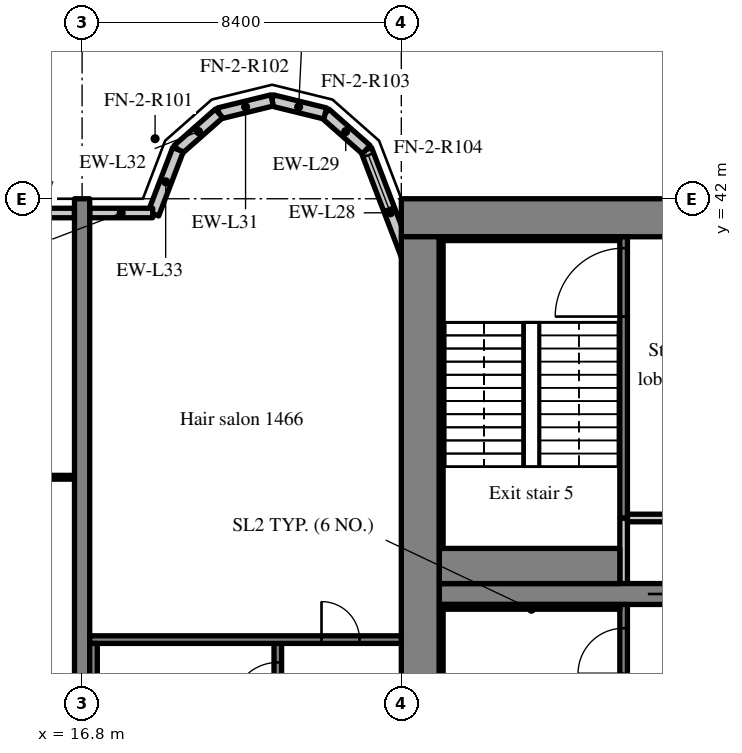
"""IFC4 building model, lengths in metres.
Left out: names, types, materials, properties, quantities, classifications, styles, units other than length and angle.
Written with IfcOpenShell. Run it as: python <this file> out.ifc"""

import sys

from ifc_helpers import new_model, si_unit, direction, frame, frame_2d, origin, place, context, subcontext, project, spatial, rectangle, extrude, source, transform, mapped, element, fill, save


model = new_model("IFC4")
c1 = context("Model", 3, precision=1e-05, world=origin(), true_north=direction((0.0, 1.0)))
c2 = subcontext(c1, "Body", "Model", "MODEL_VIEW")
j1 = project(units=[si_unit("LENGTHUNIT", "METRE"), si_unit("PLANEANGLEUNIT", "RADIAN")], contexts=[c1])
p1 = place(None, origin())
s1 = spatial("IfcSite", under=j1, at=p1, CompositionType="ELEMENT")
p2 = place(p1, origin())
s2 = spatial("IfcBuilding", under=s1, at=p2, CompositionType="ELEMENT")
p3 = place(p2, frame((0.0, 0.0, 62.0)))
s3 = spatial("IfcBuildingStorey", under=s2, at=p3, CompositionType="ELEMENT", Elevation=62.0)
m1 = source(origin(), c2, "Body", "SweptSolid", [
    extrude(rectangle(XDim=50.4, YDim=1.0, at=frame_2d((25.2, 0.0))), origin(), (0.0, 0.0, 1.0), 3.52),
])
p4 = place(p3, frame((25.2, 41.5, 0.0), z_axis=(0.0, 0.0, 1.0), x_axis=(1.0, 0.0, 0.0)))
e1 = element("IfcWall", 1, at=p4, inside=s3, PredefinedType="SHEAR", context=c2, shape_type="MappedRepresentation", body=[
    mapped(m1, transform((0.0, 0.0, 0.0), scale=1.0)),
])
m2 = source(origin(), c2, "Body", "SweptSolid", [
    extrude(rectangle(XDim=18.0, YDim=1.0, at=frame_2d((9.0, 0.0))), origin(), (0.0, 0.0, 1.0), 3.52),
])
p5 = place(p3, frame((25.7, 23.0, 0.0), z_axis=(0.0, 0.0, 1.0), x_axis=(0.0, 1.0, 0.0)))
e2 = element("IfcWall", 2, at=p5, inside=s3, PredefinedType="SHEAR", context=c2, shape_type="MappedRepresentation", body=[
    mapped(m2, transform((0.0, 0.0, 0.0), scale=1.0)),
])
m3 = source(origin(), c2, "Body", "SweptSolid", [
    extrude(rectangle(XDim=7.125, YDim=0.55, at=frame_2d((3.562, 0.0))), origin(), (0.0, 0.0, 1.0), 3.52),
])
p6 = place(p3, frame((26.2, 31.6, 0.0), z_axis=(0.0, 0.0, 1.0), x_axis=(1.0, 0.0, 0.0)))
e3 = element("IfcWall", 3, at=p6, inside=s3, PredefinedType="SHEAR", context=c2, shape_type="MappedRepresentation", body=[
    mapped(m3, transform((0.0, 0.0, 0.0), scale=1.0)),
])
m4 = source(origin(), c2, "Body", "SweptSolid", [
    extrude(rectangle(XDim=1.1, YDim=2.1, at=frame_2d((0.55, 1.05))), frame((0.0, 0.285, 0.0), z_axis=(0.0, -1.0, 0.0), x_axis=(1.0, 0.0, 0.0)), (0.0, 0.0, 1.0), 0.57),
])
p7 = place(p6, frame((5.488, 0.0, 0.0)))
e4 = element("IfcOpeningElement", 4, at=p7, cuts=e3, PredefinedType="OPENING", context=c2, shape_type="MappedRepresentation", body=[
    mapped(m4, transform((0.0, 0.0, 0.0), scale=1.0)),
])
m5 = source(origin(), c2, "Body", "SweptSolid", [
    extrude(rectangle(XDim=20.0, YDim=0.4, at=frame_2d((10.0, 0.0))), origin(), (0.0, 0.0, 1.0), 3.52),
])
p8 = place(p3, frame((16.8, 22.0, 0.0), z_axis=(0.0, 0.0, 1.0), x_axis=(0.0, 1.0, 0.0)))
e5 = element("IfcWall", 5, at=p8, inside=s3, PredefinedType="SHEAR", context=c2, shape_type="MappedRepresentation", body=[
    mapped(m5, transform((0.0, 0.0, 0.0), scale=1.0)),
])
m6 = source(origin(), c2, "Body", "SweptSolid", [
    extrude(rectangle(XDim=3.559, YDim=0.3, at=frame_2d((1.78, 0.0))), origin(), (0.0, 0.0, 1.0), 3.52),
])
p9 = place(p3, frame((25.55, 39.969, 0.0), z_axis=(0.0, 0.0, 1.0), x_axis=(-0.35779745313, 0.933799219604, 0.0)))
e6 = element("IfcWall", 6, at=p9, inside=s3, PredefinedType="SOLIDWALL", context=c2, shape_type="MappedRepresentation", body=[
    mapped(m6, transform((0.0, 0.0, 0.0), scale=1.0)),
])
m7 = source(origin(), c2, "Body", "SweptSolid", [
    extrude(rectangle(XDim=1.5, YDim=2.0, at=frame_2d((0.75, 1.0))), frame((0.0, 0.16, 0.0), z_axis=(0.0, -1.0, 0.0), x_axis=(1.0, 0.0, 0.0)), (0.0, 0.0, 1.0), 0.32),
])
p10 = place(p9, frame((1.903, 0.0, 0.9)))
e7 = element("IfcOpeningElement", 7, at=p10, cuts=e6, PredefinedType="OPENING", context=c2, shape_type="MappedRepresentation", body=[
    mapped(m7, transform((0.0, 0.0, 0.0), scale=1.0)),
])
m8 = source(origin(), c2, "Body", "SweptSolid", [
    extrude(rectangle(XDim=1.44, YDim=0.3, at=frame_2d((0.72, 0.0))), origin(), (0.0, 0.0, 1.0), 3.52),
])
p11 = place(p3, frame((24.277, 43.292, 0.0), z_axis=(0.0, 0.0, 1.0), x_axis=(-0.749649827867, 0.661834673902, 0.0)))
e8 = element("IfcWall", 8, at=p11, inside=s3, PredefinedType="SOLIDWALL", context=c2, shape_type="MappedRepresentation", body=[
    mapped(m8, transform((0.0, 0.0, 0.0), scale=1.0)),
])
m9 = source(origin(), c2, "Body", "SweptSolid", [
    extrude(rectangle(XDim=1.438, YDim=0.3, at=frame_2d((0.719, 0.0))), origin(), (0.0, 0.0, 1.0), 3.52),
])
p12 = place(p3, frame((23.197, 44.245, 0.0), z_axis=(0.0, 0.0, 1.0), x_axis=(-0.971152283879, 0.238460146601, 0.0)))
e9 = element("IfcWall", 9, at=p12, inside=s3, PredefinedType="SOLIDWALL", context=c2, shape_type="MappedRepresentation", body=[
    mapped(m9, transform((0.0, 0.0, 0.0), scale=1.0)),
])
m10 = source(origin(), c2, "Body", "SweptSolid", [
    extrude(rectangle(XDim=1.439, YDim=0.3, at=frame_2d((0.719, 0.0))), origin(), (0.0, 0.0, 1.0), 3.52),
])
p13 = place(p3, frame((21.8, 44.588, 0.0), z_axis=(0.0, 0.0, 1.0), x_axis=(-0.971161932466, -0.238420848351, 0.0)))
e10 = element("IfcWall", 10, at=p13, inside=s3, PredefinedType="SOLIDWALL", context=c2, shape_type="MappedRepresentation", body=[
    mapped(m10, transform((0.0, 0.0, 0.0), scale=1.0)),
])
m11 = source(origin(), c2, "Body", "SweptSolid", [
    extrude(rectangle(XDim=1.44, YDim=0.3, at=frame_2d((0.72, 0.0))), origin(), (0.0, 0.0, 1.0), 3.52),
])
p14 = place(p3, frame((20.403, 44.245, 0.0), z_axis=(0.0, 0.0, 1.0), x_axis=(-0.74957555648, -0.661918790432, 0.0)))
e11 = element("IfcWall", 11, at=p14, inside=s3, PredefinedType="SOLIDWALL", context=c2, shape_type="MappedRepresentation", body=[
    mapped(m11, transform((0.0, 0.0, 0.0), scale=1.0)),
])
m12 = source(origin(), c2, "Body", "SweptSolid", [
    extrude(rectangle(XDim=1.812, YDim=0.3, at=frame_2d((0.906, 0.0))), origin(), (0.0, 0.0, 1.0), 3.52),
])
p15 = place(p3, frame((19.323, 43.292, 0.0), z_axis=(0.0, 0.0, 1.0), x_axis=(-0.357877270961, -0.93376863244, 0.0)))
e12 = element("IfcWall", 12, at=p15, inside=s3, PredefinedType="SOLIDWALL", context=c2, shape_type="MappedRepresentation", body=[
    mapped(m12, transform((0.0, 0.0, 0.0), scale=1.0)),
])
m13 = source(origin(), c2, "Body", "SweptSolid", [
    extrude(rectangle(XDim=3.6, YDim=0.25, at=frame_2d((1.8, 0.0))), origin(), (0.0, 0.0, 1.0), 2.82),
])
p16 = place(p3, frame((16.6, 41.625, 0.0), z_axis=(0.0, 0.0, 1.0), x_axis=(-1.0, 0.0, 0.0)))
e13 = element("IfcWall", 13, at=p16, inside=s3, PredefinedType="SOLIDWALL", context=c2, shape_type="MappedRepresentation", body=[
    mapped(m13, transform((0.0, 0.0, 0.0), scale=1.0)),
])
m14 = source(origin(), c2, "Body", "SweptSolid", [
    extrude(rectangle(XDim=1.5, YDim=1.5, at=frame_2d((0.75, 0.75))), frame((0.0, 0.135, 0.0), z_axis=(0.0, -1.0, 0.0), x_axis=(1.0, 0.0, 0.0)), (0.0, 0.0, 1.0), 0.27),
])
p17 = place(p16, frame((1.05, 0.0, 0.9)))
e14 = element("IfcOpeningElement", 14, at=p17, cuts=e13, PredefinedType="OPENING", context=c2, shape_type="MappedRepresentation", body=[
    mapped(m14, transform((0.0, 0.0, 0.0), scale=1.0)),
])
m15 = source(origin(), c2, "Body", "SweptSolid", [
    extrude(rectangle(XDim=1.658, YDim=0.25, at=frame_2d((0.829, 0.0))), origin(), (0.0, 0.0, 1.0), 2.82),
])
p18 = place(p3, frame((18.658, 41.625, 0.0), z_axis=(0.0, 0.0, 1.0), x_axis=(-1.0, 0.0, 0.0)))
e15 = element("IfcWall", 15, at=p18, inside=s3, PredefinedType="SOLIDWALL", context=c2, shape_type="MappedRepresentation", body=[
    mapped(m15, transform((0.0, 0.0, 0.0), scale=1.0)),
])
m16 = source(origin(), c2, "Body", "SweptSolid", [
    extrude(rectangle(XDim=8.325, YDim=0.2, at=frame_2d((4.163, 0.0))), origin(), (0.0, 0.0, 1.0), 3.52),
])
p19 = place(p3, frame((31.05, 23.0, 0.0), z_axis=(0.0, 0.0, 1.0), x_axis=(0.0, 1.0, 0.0)))
e16 = element("IfcWall", 16, at=p19, inside=s3, PredefinedType="SOLIDWALL", context=c2, shape_type="MappedRepresentation", body=[
    mapped(m16, transform((0.0, 0.0, 0.0), scale=1.0)),
])
m17 = source(origin(), c2, "Body", "SweptSolid", [
    extrude(rectangle(XDim=1.2, YDim=2.1, at=frame_2d((0.6, 1.05))), frame((0.0, 0.11, 0.0), z_axis=(0.0, -1.0, 0.0), x_axis=(1.0, 0.0, 0.0)), (0.0, 0.0, 1.0), 0.22),
])
p20 = place(p19, frame((6.5, 0.0, 0.0)))
e17 = element("IfcOpeningElement", 17, at=p20, cuts=e16, PredefinedType="OPENING", context=c2, shape_type="MappedRepresentation", body=[
    mapped(m17, transform((0.0, 0.0, 0.0), scale=1.0)),
])
m18 = source(origin(), c2, "Body", "SweptSolid", [
    extrude(rectangle(XDim=1.725, YDim=0.2, at=frame_2d((0.863, 0.0))), origin(), (0.0, 0.0, 1.0), 3.52),
])
p21 = place(p3, frame((31.05, 31.875, 0.0), z_axis=(0.0, 0.0, 1.0), x_axis=(0.0, 1.0, 0.0)))
e18 = element("IfcWall", 18, at=p21, inside=s3, PredefinedType="SOLIDWALL", context=c2, shape_type="MappedRepresentation", body=[
    mapped(m18, transform((0.0, 0.0, 0.0), scale=1.0)),
])
m19 = source(origin(), c2, "Body", "SweptSolid", [
    extrude(rectangle(XDim=2.175, YDim=0.2, at=frame_2d((1.087, 0.0))), origin(), (0.0, 0.0, 1.0), 3.52),
])
p22 = place(p3, frame((31.15, 33.6, 0.0), z_axis=(0.0, 0.0, 1.0), x_axis=(1.0, 0.0, 0.0)))
e19 = element("IfcWall", 19, at=p22, inside=s3, PredefinedType="SOLIDWALL", context=c2, shape_type="MappedRepresentation", body=[
    mapped(m19, transform((0.0, 0.0, 0.0), scale=1.0)),
])
m20 = source(origin(), c2, "Body", "SweptSolid", [
    extrude(rectangle(XDim=7.4, YDim=0.2, at=frame_2d((3.7, 0.0))), origin(), (0.0, 0.0, 1.0), 3.52),
])
p23 = place(p3, frame((31.05, 33.6, 0.0), z_axis=(0.0, 0.0, 1.0), x_axis=(0.0, 1.0, 0.0)))
e20 = element("IfcWall", 20, at=p23, inside=s3, PredefinedType="SOLIDWALL", context=c2, shape_type="MappedRepresentation", body=[
    mapped(m20, transform((0.0, 0.0, 0.0), scale=1.0)),
])
m21 = source(origin(), c2, "Body", "SweptSolid", [
    extrude(rectangle(XDim=1.8, YDim=2.1, at=frame_2d((0.9, 1.05))), frame((0.0, 0.11, 0.0), z_axis=(0.0, -1.0, 0.0), x_axis=(1.0, 0.0, 0.0)), (0.0, 0.0, 1.0), 0.22),
])
p24 = place(p23, frame((5.3, 0.0, 0.0)))
e21 = element("IfcOpeningElement", 21, at=p24, cuts=e20, PredefinedType="OPENING", context=c2, shape_type="MappedRepresentation", body=[
    mapped(m21, transform((0.0, 0.0, 0.0), scale=1.0)),
])
m22 = source(origin(), c2, "Body", "SweptSolid", [
    extrude(rectangle(XDim=8.3, YDim=0.2, at=frame_2d((4.15, 0.0))), origin(), (0.0, 0.0, 1.0), 3.52),
])
p25 = place(p3, frame((21.95, 22.1, 0.0), z_axis=(0.0, 0.0, 1.0), x_axis=(0.0, 1.0, 0.0)))
e22 = element("IfcWall", 22, at=p25, inside=s3, PredefinedType="SOLIDWALL", context=c2, shape_type="MappedRepresentation", body=[
    mapped(m22, transform((0.0, 0.0, 0.0), scale=1.0)),
])
p26 = place(p25, frame((6.5, 0.0, 0.0)))
e23 = element("IfcOpeningElement", 23, at=p26, cuts=e22, PredefinedType="OPENING", context=c2, shape_type="MappedRepresentation", body=[
    mapped(m17, transform((0.0, 0.0, 0.0), scale=1.0)),
])
m23 = source(origin(), c2, "Body", "SweptSolid", [
    extrude(rectangle(XDim=8.2, YDim=0.2, at=frame_2d((4.1, 0.0))), origin(), (0.0, 0.0, 1.0), 3.52),
])
p27 = place(p3, frame((17.0, 30.4, 0.0), z_axis=(0.0, 0.0, 1.0), x_axis=(1.0, 0.0, 0.0)))
e24 = element("IfcWall", 24, at=p27, inside=s3, PredefinedType="SOLIDWALL", context=c2, shape_type="MappedRepresentation", body=[
    mapped(m23, transform((0.0, 0.0, 0.0), scale=1.0)),
])
m24 = source(origin(), c2, "Body", "SweptSolid", [
    extrude(rectangle(XDim=1.0, YDim=2.1, at=frame_2d((0.5, 1.05))), frame((0.0, 0.11, 0.0), z_axis=(0.0, -1.0, 0.0), x_axis=(1.0, 0.0, 0.0)), (0.0, 0.0, 1.0), 0.22),
])
p28 = place(p27, frame((6.1, 0.0, 0.0)))
e25 = element("IfcOpeningElement", 25, at=p28, cuts=e24, PredefinedType="OPENING", context=c2, shape_type="MappedRepresentation", body=[
    mapped(m24, transform((0.0, 0.0, 0.0), scale=1.0)),
])
m25 = source(origin(), c2, "Body", "SweptSolid", [
    extrude(rectangle(XDim=4.75, YDim=0.125, at=frame_2d((2.375, 0.0))), origin(), (0.0, 0.0, 1.0), 3.52),
])
p29 = place(p3, frame((26.2, 31.262, 0.0), z_axis=(0.0, 0.0, 1.0), x_axis=(1.0, 0.0, 0.0)))
e26 = element("IfcWall", 26, at=p29, inside=s3, PredefinedType="SOLIDWALL", context=c2, shape_type="MappedRepresentation", body=[
    mapped(m25, transform((0.0, 0.0, 0.0), scale=1.0)),
])
m26 = source(origin(), c2, "Body", "SweptSolid", [
    extrude(rectangle(XDim=8.1, YDim=0.1, at=frame_2d((4.05, 0.0))), origin(), (0.0, 0.0, 1.0), 3.52),
])
p30 = place(p3, frame((26.25, 23.1, 0.0), z_axis=(0.0, 0.0, 1.0), x_axis=(0.0, 1.0, 0.0)))
e27 = element("IfcWall", 27, at=p30, inside=s3, PredefinedType="SOLIDWALL", context=c2, shape_type="MappedRepresentation", body=[
    mapped(m26, transform((0.0, 0.0, 0.0), scale=1.0)),
])
m27 = source(origin(), c2, "Body", "SweptSolid", [
    extrude(rectangle(XDim=8.1, YDim=0.2, at=frame_2d((4.05, 0.0))), origin(), (0.0, 0.0, 1.0), 3.52),
])
p31 = place(p3, frame((17.1, 22.2, 0.0), z_axis=(0.0, 0.0, 1.0), x_axis=(0.0, 1.0, 0.0)))
e28 = element("IfcWall", 28, at=p31, inside=s3, PredefinedType="SOLIDWALL", context=c2, shape_type="MappedRepresentation", body=[
    mapped(m27, transform((0.0, 0.0, 0.0), scale=1.0)),
])
m28 = source(origin(), c2, "Body", "SweptSolid", [
    extrude(rectangle(XDim=4.75, YDim=0.1, at=frame_2d((2.375, 0.0))), origin(), (0.0, 0.0, 1.0), 3.52),
])
p32 = place(p3, frame((26.2, 40.95, 0.0), z_axis=(0.0, 0.0, 1.0), x_axis=(1.0, 0.0, 0.0)))
e29 = element("IfcWall", 29, at=p32, inside=s3, PredefinedType="SOLIDWALL", context=c2, shape_type="MappedRepresentation", body=[
    mapped(m28, transform((0.0, 0.0, 0.0), scale=1.0)),
])
m29 = source(origin(), c2, "Body", "SweptSolid", [
    extrude(rectangle(XDim=4.75, YDim=0.925, at=frame_2d((2.375, 0.0))), origin(), (0.0, 0.0, 1.0), 3.52),
])
p33 = place(p3, frame((26.2, 32.337, 0.0), z_axis=(0.0, 0.0, 1.0), x_axis=(1.0, 0.0, 0.0)))
e30 = element("IfcWall", 30, at=p33, inside=s3, PredefinedType="SOLIDWALL", context=c2, shape_type="MappedRepresentation", body=[
    mapped(m29, transform((0.0, 0.0, 0.0), scale=1.0)),
])
p34 = place(p3, frame((26.25, 32.8, 0.0), z_axis=(0.0, 0.0, 1.0), x_axis=(0.0, 1.0, 0.0)))
e31 = element("IfcWall", 31, at=p34, inside=s3, PredefinedType="SOLIDWALL", context=c2, shape_type="MappedRepresentation", body=[
    mapped(m26, transform((0.0, 0.0, 0.0), scale=1.0)),
])
m30 = source(origin(), c2, "Body", "SweptSolid", [
    extrude(rectangle(XDim=8.0, YDim=0.1, at=frame_2d((4.0, 0.0))), origin(), (0.0, 0.0, 1.0), 3.52),
])
p35 = place(p3, frame((8.6, 34.672, 0.0), z_axis=(0.0, 0.0, 1.0), x_axis=(1.0, 0.0, 0.0)))
e32 = element("IfcWall", 32, at=p35, inside=s3, PredefinedType="PARTITIONING", context=c2, shape_type="MappedRepresentation", body=[
    mapped(m30, transform((0.0, 0.0, 0.0), scale=1.0)),
])
m31 = source(origin(), c2, "Body", "SweptSolid", [
    extrude(rectangle(XDim=1.8, YDim=2.1, at=frame_2d((0.9, 1.05))), frame((0.0, 0.06, 0.0), z_axis=(0.0, -1.0, 0.0), x_axis=(1.0, 0.0, 0.0)), (0.0, 0.0, 1.0), 0.12),
])
p36 = place(p35, frame((3.1, 0.0, 0.0)))
e33 = element("IfcOpeningElement", 33, at=p36, cuts=e32, PredefinedType="OPENING", context=c2, shape_type="MappedRepresentation", body=[
    mapped(m31, transform((0.0, 0.0, 0.0), scale=1.0)),
])
m32 = source(origin(), c2, "Body", "SweptSolid", [
    extrude(rectangle(XDim=1.5, YDim=2.0, at=frame_2d((0.75, 1.0))), frame((0.0, 0.03, 0.0), z_axis=(0.0, -1.0, 0.0), x_axis=(1.0, 0.0, 0.0)), (0.0, 0.0, 1.0), 0.06),
])
p37 = place(p10, origin())
e34 = element("IfcWindow", 34, at=p37, inside=s3, PartitioningType="SINGLE_PANEL", PredefinedType="WINDOW", context=c2, shape_type="MappedRepresentation", body=[
    mapped(m32, transform((0.0, 0.0, 0.0), scale=1.0)),
])
fill(e7, e34)
m33 = source(origin(), c2, "Body", "SweptSolid", [
    extrude(rectangle(XDim=1.2, YDim=2.1, at=frame_2d((0.6, 1.05))), frame((0.0, 0.025, 0.0), z_axis=(0.0, -1.0, 0.0), x_axis=(1.0, 0.0, 0.0)), (0.0, 0.0, 1.0), 0.05),
])
p38 = place(p20, origin())
e35 = element("IfcDoor", 35, at=p38, inside=s3, OperationType="SINGLE_SWING_LEFT", PredefinedType="DOOR", context=c2, shape_type="MappedRepresentation", body=[
    mapped(m33, transform((0.0, 0.0, 0.0), scale=1.0)),
])
fill(e17, e35)
m34 = source(origin(), c2, "Body", "SweptSolid", [
    extrude(rectangle(XDim=1.1, YDim=2.1, at=frame_2d((0.55, 1.05))), frame((0.0, 0.025, 0.0), z_axis=(0.0, -1.0, 0.0), x_axis=(1.0, 0.0, 0.0)), (0.0, 0.0, 1.0), 0.05),
])
p39 = place(p7, origin())
e36 = element("IfcDoor", 36, at=p39, inside=s3, OperationType="SLIDING_TO_RIGHT", PredefinedType="DOOR", context=c2, shape_type="MappedRepresentation", body=[
    mapped(m34, transform((0.0, 0.0, 0.0), scale=1.0)),
])
fill(e4, e36)
m35 = source(origin(), c2, "Body", "SweptSolid", [
    extrude(rectangle(XDim=1.8, YDim=2.1, at=frame_2d((0.9, 1.05))), frame((0.0, 0.025, 0.0), z_axis=(0.0, -1.0, 0.0), x_axis=(1.0, 0.0, 0.0)), (0.0, 0.0, 1.0), 0.05),
])
p40 = place(p24, origin())
e37 = element("IfcDoor", 37, at=p40, inside=s3, OperationType="SINGLE_SWING_LEFT", PredefinedType="DOOR", context=c2, shape_type="MappedRepresentation", body=[
    mapped(m35, transform((0.0, 0.0, 0.0), scale=1.0)),
])
fill(e21, e37)
p41 = place(p26, origin())
e38 = element("IfcDoor", 38, at=p41, inside=s3, OperationType="SINGLE_SWING_LEFT", PredefinedType="DOOR", context=c2, shape_type="MappedRepresentation", body=[
    mapped(m33, transform((0.0, 0.0, 0.0), scale=1.0)),
])
fill(e23, e38)
m36 = source(origin(), c2, "Body", "SweptSolid", [
    extrude(rectangle(XDim=1.0, YDim=2.1, at=frame_2d((0.5, 1.05))), frame((0.0, 0.025, 0.0), z_axis=(0.0, -1.0, 0.0), x_axis=(1.0, 0.0, 0.0)), (0.0, 0.0, 1.0), 0.05),
])
p42 = place(p28, origin())
e39 = element("IfcDoor", 39, at=p42, inside=s3, OperationType="SINGLE_SWING_LEFT", PredefinedType="DOOR", context=c2, shape_type="MappedRepresentation", body=[
    mapped(m36, transform((0.0, 0.0, 0.0), scale=1.0)),
])
fill(e25, e39)
save(model, sys.argv[1])
